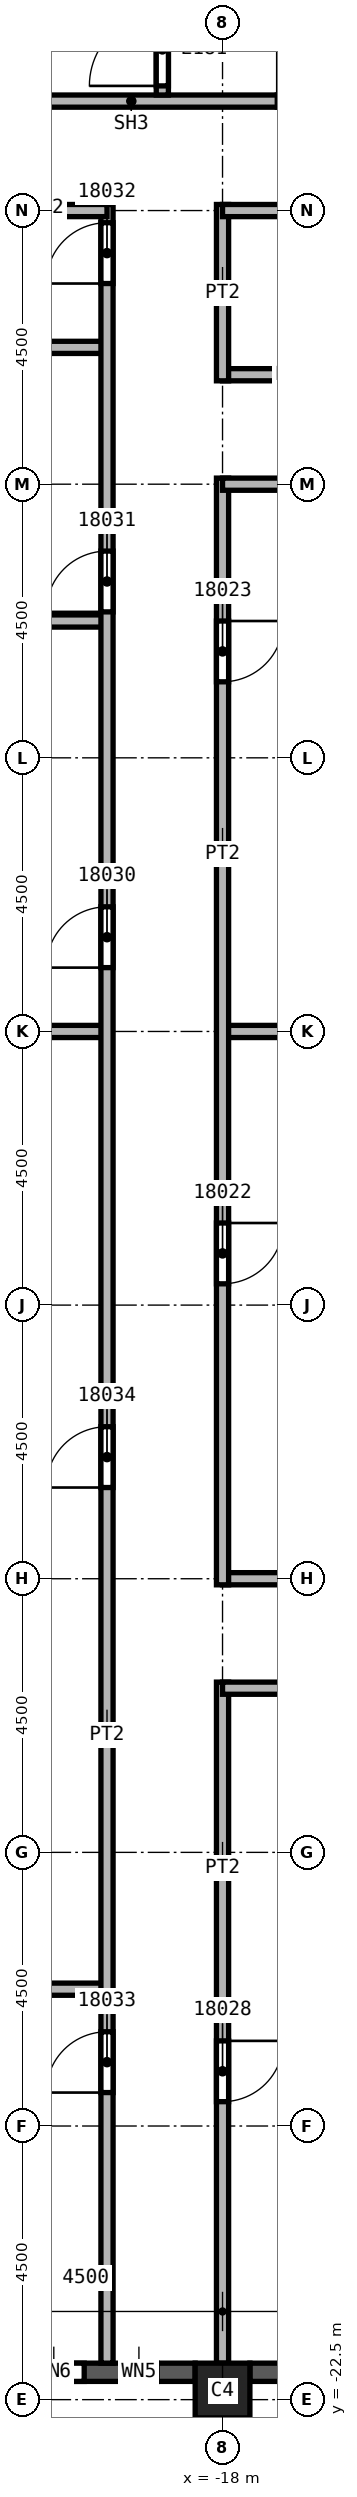
"""IFC4 building model, lengths in metres.
Left out: names, types, materials, properties, quantities, classifications, styles, units other than length and angle.
Written with IfcOpenShell. Run it as: python <this file> out.ifc"""

import sys

from ifc_helpers import new_model, si_unit, direction, frame, frame_2d, origin, origin_2d, place, context, subcontext, project, spatial, rectangle, extrude, element, fill, save


model = new_model("IFC4")
c1 = context("Model", 3, precision=1e-05, world=origin(), true_north=direction((0.0, 1.0)))
c2 = subcontext(c1, "Body", "Model", "MODEL_VIEW")
j1 = project(units=[si_unit("LENGTHUNIT", "METRE"), si_unit("PLANEANGLEUNIT", "RADIAN")], contexts=[c1])
p1 = place(None, origin())
s1 = spatial("IfcSite", under=j1, at=p1, CompositionType="ELEMENT")
p2 = place(p1, origin())
s2 = spatial("IfcBuilding", under=s1, at=p2, CompositionType="ELEMENT")
p3 = place(p2, frame((0.0, 0.0, 266.0)))
s3 = spatial("IfcBuildingStorey", under=s2, at=p3, CompositionType="ELEMENT", Elevation=266.0)
p4 = place(p3, frame((-18.0, -22.35, 0.0), z_axis=(0.0, 0.0, 1.0), x_axis=(1.0, 0.0, 0.0)))
e1 = element("IfcColumn", 1, at=p4, inside=s3, PredefinedType="COLUMN", context=c2, shape_type="SweptSolid", body=[
    extrude(rectangle(XDim=0.9, YDim=0.9, at=origin_2d()), origin(), (0.0, 0.0, 1.0), 3.72),
])
p5 = place(p3, frame((-22.05, -22.05, 0.0), z_axis=(0.0, 0.0, 1.0), x_axis=(1.0, 0.0, 0.0)))
e2 = element("IfcWall", 2, at=p5, inside=s3, PredefinedType="SOLIDWALL", context=c2, shape_type="SweptSolid", body=[
    extrude(rectangle(XDim=3.6, YDim=0.3, at=frame_2d((1.8, 0.0))), origin(), (0.0, 0.0, 1.0), 3.12),
])
p6 = place(p5, frame((0.775, 0.0, 0.8)))
e3 = element("IfcOpeningElement", 3, at=p6, cuts=e2, PredefinedType="OPENING", context=c2, shape_type="SweptSolid", body=[
    extrude(rectangle(XDim=1.0, YDim=1.95, at=frame_2d((0.5, 0.975))), frame((0.0, 0.15, 0.0), z_axis=(0.0, -1.0, 0.0), x_axis=(1.0, 0.0, 0.0)), (0.0, 0.0, 1.0), 0.3),
])
p7 = place(p5, frame((2.375, 0.0, 0.8)))
e4 = element("IfcOpeningElement", 4, at=p7, cuts=e2, PredefinedType="OPENING", context=c2, shape_type="SweptSolid", body=[
    extrude(rectangle(XDim=0.6, YDim=1.95, at=frame_2d((0.3, 0.975))), frame((0.0, 0.15, 0.0), z_axis=(0.0, -1.0, 0.0), x_axis=(1.0, 0.0, 0.0)), (0.0, 0.0, 1.0), 0.3),
])
p8 = place(p3, frame((-17.55, -22.05, 0.0), z_axis=(0.0, 0.0, 1.0), x_axis=(1.0, 0.0, 0.0)))
e5 = element("IfcWall", 5, at=p8, inside=s3, PredefinedType="SOLIDWALL", context=c2, shape_type="SweptSolid", body=[
    extrude(rectangle(XDim=3.6, YDim=0.3, at=frame_2d((1.8, 0.0))), origin(), (0.0, 0.0, 1.0), 3.12),
])
p9 = place(p8, frame((0.6, 0.0, 0.8)))
e6 = element("IfcOpeningElement", 6, at=p9, cuts=e5, PredefinedType="OPENING", context=c2, shape_type="SweptSolid", body=[
    extrude(rectangle(XDim=2.4, YDim=1.95, at=frame_2d((1.2, 0.975))), frame((0.0, 0.15, 0.0), z_axis=(0.0, -1.0, 0.0), x_axis=(1.0, 0.0, 0.0)), (0.0, 0.0, 1.0), 0.3),
])
for number, where, z_axis, x_axis in (
    (7, (-26.55, -15.75, 0.0), (0.0, 0.0, 1.0), (1.0, 0.0, 0.0)),
    (8, (-26.55, 6.75, 0.0), (0.0, 0.0, 1.0), (1.0, 0.0, 0.0)),
    (9, (-26.55, 11.25, 0.0), (0.0, 0.0, 1.0), (1.0, 0.0, 0.0)),
    (10, (-19.9, 0.0, 0.0), (0.0, 0.0, 1.0), (-1.0, 0.0, 0.0)),
):
    element("IfcWall", number, at=place(p3, frame(where, z_axis=z_axis, x_axis=x_axis)), inside=s3, PredefinedType="PARTITIONING", context=c2, shape_type="SweptSolid", body=[
        extrude(rectangle(XDim=6.65, YDim=0.2, at=frame_2d((3.325, 0.0))), origin(), (0.0, 0.0, 1.0), 3.72),
    ])
p10 = place(p3, frame((-19.9, -21.9, 0.0), z_axis=(0.0, 0.0, 1.0), x_axis=(0.0, 1.0, 0.0)))
e11 = element("IfcWall", 11, at=p10, inside=s3, PredefinedType="PARTITIONING", context=c2, shape_type="SweptSolid", body=[
    extrude(rectangle(XDim=35.5, YDim=0.2, at=frame_2d((17.75, 0.0))), origin(), (0.0, 0.0, 1.0), 3.72),
])
p11 = place(p10, frame((22.95, 0.0, 0.0)))
e12 = element("IfcOpeningElement", 12, at=p11, cuts=e11, PredefinedType="OPENING", context=c2, shape_type="SweptSolid", body=[
    extrude(rectangle(XDim=1.0, YDim=2.1, at=frame_2d((0.5, 1.05))), frame((0.0, 0.1, 0.0), z_axis=(0.0, -1.0, 0.0), x_axis=(1.0, 0.0, 0.0)), (0.0, 0.0, 1.0), 0.2),
])
p12 = place(p10, frame((28.8, 0.0, 0.0)))
e13 = element("IfcOpeningElement", 13, at=p12, cuts=e11, PredefinedType="OPENING", context=c2, shape_type="SweptSolid", body=[
    extrude(rectangle(XDim=1.0, YDim=2.1, at=frame_2d((0.5, 1.05))), frame((0.0, 0.1, 0.0), z_axis=(0.0, -1.0, 0.0), x_axis=(1.0, 0.0, 0.0)), (0.0, 0.0, 1.0), 0.2),
])
p13 = place(p10, frame((34.2, 0.0, 0.0)))
e14 = element("IfcOpeningElement", 14, at=p13, cuts=e11, PredefinedType="OPENING", context=c2, shape_type="SweptSolid", body=[
    extrude(rectangle(XDim=1.0, YDim=2.1, at=frame_2d((0.5, 1.05))), frame((0.0, 0.1, 0.0), z_axis=(0.0, -1.0, 0.0), x_axis=(1.0, 0.0, 0.0)), (0.0, 0.0, 1.0), 0.2),
])
p14 = place(p10, frame((4.45, 0.0, 0.0)))
e15 = element("IfcOpeningElement", 15, at=p14, cuts=e11, PredefinedType="OPENING", context=c2, shape_type="SweptSolid", body=[
    extrude(rectangle(XDim=1.0, YDim=2.1, at=frame_2d((0.5, 1.05))), frame((0.0, 0.1, 0.0), z_axis=(0.0, -1.0, 0.0), x_axis=(1.0, 0.0, 0.0)), (0.0, 0.0, 1.0), 0.2),
])
p15 = place(p10, frame((14.4, 0.0, 0.0)))
e16 = element("IfcOpeningElement", 16, at=p15, cuts=e11, PredefinedType="OPENING", context=c2, shape_type="SweptSolid", body=[
    extrude(rectangle(XDim=1.0, YDim=2.1, at=frame_2d((0.5, 1.05))), frame((0.0, 0.1, 0.0), z_axis=(0.0, -1.0, 0.0), x_axis=(1.0, 0.0, 0.0)), (0.0, 0.0, 1.0), 0.2),
])
p16 = place(p3, frame((-19.9, 13.5, 0.0), z_axis=(0.0, 0.0, 1.0), x_axis=(-1.0, 0.0, 0.0)))
e17 = element("IfcWall", 17, at=p16, inside=s3, PredefinedType="PARTITIONING", context=c2, shape_type="SweptSolid", body=[
    extrude(rectangle(XDim=2.1, YDim=0.2, at=frame_2d((1.05, 0.0))), origin(), (0.0, 0.0, 1.0), 3.72),
])
p17 = place(p3, frame((-18.0, -10.7, 0.0), z_axis=(0.0, 0.0, 1.0), x_axis=(0.0, -1.0, 0.0)))
e18 = element("IfcWall", 18, at=p17, inside=s3, PredefinedType="PARTITIONING", context=c2, shape_type="SweptSolid", body=[
    extrude(rectangle(XDim=11.2, YDim=0.2, at=frame_2d((5.6, 0.0))), origin(), (0.0, 0.0, 1.0), 3.72),
])
p18 = place(p17, frame((5.9, 0.0, 0.0)))
e19 = element("IfcOpeningElement", 19, at=p18, cuts=e18, PredefinedType="OPENING", context=c2, shape_type="SweptSolid", body=[
    extrude(rectangle(XDim=1.0, YDim=2.1, at=frame_2d((0.5, 1.05))), frame((0.0, 0.1, 0.0), z_axis=(0.0, -1.0, 0.0), x_axis=(1.0, 0.0, 0.0)), (0.0, 0.0, 1.0), 0.2),
])
for number, where, z_axis, x_axis in (
    (20, (-18.0, -9.0, 0.0), (0.0, 0.0, 1.0), (1.0, 0.0, 0.0)),
    (21, (-18.0, 0.0, 0.0), (0.0, 0.0, 1.0), (1.0, 0.0, 0.0)),
):
    element("IfcWall", number, at=place(p3, frame(where, z_axis=z_axis, x_axis=x_axis)), inside=s3, PredefinedType="PARTITIONING", context=c2, shape_type="SweptSolid", body=[
        extrude(rectangle(XDim=4.5, YDim=0.2, at=frame_2d((2.25, 0.0))), origin(), (0.0, 0.0, 1.0), 3.72),
    ])
p19 = place(p3, frame((-18.0, 9.1, 0.0), z_axis=(0.0, 0.0, 1.0), x_axis=(0.0, -1.0, 0.0)))
e22 = element("IfcWall", 22, at=p19, inside=s3, PredefinedType="PARTITIONING", context=c2, shape_type="SweptSolid", body=[
    extrude(rectangle(XDim=18.2, YDim=0.2, at=frame_2d((9.1, 0.0))), origin(), (0.0, 0.0, 1.0), 3.72),
])
p20 = place(p19, frame((12.25, 0.0, 0.0)))
e23 = element("IfcOpeningElement", 23, at=p20, cuts=e22, PredefinedType="OPENING", context=c2, shape_type="SweptSolid", body=[
    extrude(rectangle(XDim=1.0, YDim=2.1, at=frame_2d((0.5, 1.05))), frame((0.0, 0.1, 0.0), z_axis=(0.0, -1.0, 0.0), x_axis=(1.0, 0.0, 0.0)), (0.0, 0.0, 1.0), 0.2),
])
p21 = place(p19, frame((2.35, 0.0, 0.0)))
e24 = element("IfcOpeningElement", 24, at=p21, cuts=e22, PredefinedType="OPENING", context=c2, shape_type="SweptSolid", body=[
    extrude(rectangle(XDim=1.0, YDim=2.1, at=frame_2d((0.5, 1.05))), frame((0.0, 0.1, 0.0), z_axis=(0.0, -1.0, 0.0), x_axis=(1.0, 0.0, 0.0)), (0.0, 0.0, 1.0), 0.2),
])
p22 = place(p3, frame((-18.0, 10.8, 0.0), z_axis=(0.0, 0.0, 1.0), x_axis=(1.0, 0.0, 0.0)))
e25 = element("IfcWall", 25, at=p22, inside=s3, PredefinedType="PARTITIONING", context=c2, shape_type="SweptSolid", body=[
    extrude(rectangle(XDim=3.6, YDim=0.2, at=frame_2d((1.8, 0.0))), origin(), (0.0, 0.0, 1.0), 3.72),
])
p23 = place(p22, frame((2.2, 0.0, 0.0)))
e26 = element("IfcOpeningElement", 26, at=p23, cuts=e25, PredefinedType="OPENING", context=c2, shape_type="SweptSolid", body=[
    extrude(rectangle(XDim=1.0, YDim=2.1, at=frame_2d((0.5, 1.05))), frame((0.0, 0.1, 0.0), z_axis=(0.0, -1.0, 0.0), x_axis=(1.0, 0.0, 0.0)), (0.0, 0.0, 1.0), 0.2),
])
p24 = place(p3, frame((-18.0, 13.6, 0.0), z_axis=(0.0, 0.0, 1.0), x_axis=(0.0, -1.0, 0.0)))
e27 = element("IfcWall", 27, at=p24, inside=s3, PredefinedType="PARTITIONING", context=c2, shape_type="SweptSolid", body=[
    extrude(rectangle(XDim=2.9, YDim=0.2, at=frame_2d((1.45, 0.0))), origin(), (0.0, 0.0, 1.0), 3.72),
])
p25 = place(p3, frame((-15.3, 13.5, 0.0), z_axis=(0.0, 0.0, 1.0), x_axis=(-1.0, 0.0, 0.0)))
e28 = element("IfcWall", 28, at=p25, inside=s3, PredefinedType="PARTITIONING", context=c2, shape_type="SweptSolid", body=[
    extrude(rectangle(XDim=2.7, YDim=0.2, at=frame_2d((1.35, 0.0))), origin(), (0.0, 0.0, 1.0), 3.72),
])
p26 = place(p3, frame((-14.4, -10.8, 0.0), z_axis=(0.0, 0.0, 1.0), x_axis=(-1.0, 0.0, 0.0)))
e29 = element("IfcWall", 29, at=p26, inside=s3, PredefinedType="PARTITIONING", context=c2, shape_type="SweptSolid", body=[
    extrude(rectangle(XDim=3.6, YDim=0.2, at=frame_2d((1.8, 0.0))), origin(), (0.0, 0.0, 1.0), 3.72),
])
p27 = place(p3, frame((-13.5, 9.0, 0.0), z_axis=(0.0, 0.0, 1.0), x_axis=(-1.0, 0.0, 0.0)))
e30 = element("IfcWall", 30, at=p27, inside=s3, PredefinedType="PARTITIONING", context=c2, shape_type="SweptSolid", body=[
    extrude(rectangle(XDim=4.5, YDim=0.2, at=frame_2d((2.25, 0.0))), origin(), (0.0, 0.0, 1.0), 3.72),
])
p28 = place(p3, frame((-21.9, 15.3, 0.0), z_axis=(0.0, 0.0, 1.0), x_axis=(1.0, 0.0, 0.0)))
e31 = element("IfcWall", 31, at=p28, inside=s3, PredefinedType="SOLIDWALL", context=c2, shape_type="SweptSolid", body=[
    extrude(rectangle(XDim=8.275, YDim=0.2, at=frame_2d((4.137, 0.0))), origin(), (0.0, 0.0, 1.0), 3.72),
])
p29 = place(p28, frame((4.8, 0.0, 0.0)))
e32 = element("IfcOpeningElement", 32, at=p29, cuts=e31, PredefinedType="OPENING", context=c2, shape_type="SweptSolid", body=[
    extrude(rectangle(XDim=1.2, YDim=2.1, at=frame_2d((0.6, 1.05))), frame((0.0, 0.1, 0.0), z_axis=(0.0, -1.0, 0.0), x_axis=(1.0, 0.0, 0.0)), (0.0, 0.0, 1.0), 0.2),
])
p30 = place(p3, frame((-18.99, 15.4, 0.0), z_axis=(0.0, 0.0, 1.0), x_axis=(0.0, 1.0, 0.0)))
e33 = element("IfcWall", 33, at=p30, inside=s3, PredefinedType="SOLIDWALL", context=c2, shape_type="SweptSolid", body=[
    extrude(rectangle(XDim=5.9, YDim=0.2, at=frame_2d((2.95, 0.0))), origin(), (0.0, 0.0, 1.0), 3.72),
])
p31 = place(p30, frame((0.15, 0.0, 0.0)))
e34 = element("IfcOpeningElement", 34, at=p31, cuts=e33, PredefinedType="OPENING", context=c2, shape_type="SweptSolid", body=[
    extrude(rectangle(XDim=1.2, YDim=2.1, at=frame_2d((0.6, 1.05))), frame((0.0, 0.1, 0.0), z_axis=(0.0, -1.0, 0.0), x_axis=(1.0, 0.0, 0.0)), (0.0, 0.0, 1.0), 0.2),
])
p32 = place(p20, origin())
e35 = element("IfcDoor", 35, at=p32, inside=s3, OperationType="SINGLE_SWING_LEFT", PredefinedType="DOOR", context=c2, shape_type="SweptSolid", body=[
    extrude(rectangle(XDim=1.0, YDim=2.1, at=frame_2d((0.5, 1.05))), frame((0.0, 0.025, 0.0), z_axis=(0.0, -1.0, 0.0), x_axis=(1.0, 0.0, 0.0)), (0.0, 0.0, 1.0), 0.05),
])
fill(e23, e35)
p33 = place(p21, origin())
e36 = element("IfcDoor", 36, at=p33, inside=s3, OperationType="SINGLE_SWING_RIGHT", PredefinedType="DOOR", context=c2, shape_type="SweptSolid", body=[
    extrude(rectangle(XDim=1.0, YDim=2.1, at=frame_2d((0.5, 1.05))), frame((0.0, 0.025, 0.0), z_axis=(0.0, -1.0, 0.0), x_axis=(1.0, 0.0, 0.0)), (0.0, 0.0, 1.0), 0.05),
])
fill(e24, e36)
p34 = place(p18, origin())
e37 = element("IfcDoor", 37, at=p34, inside=s3, OperationType="SINGLE_SWING_LEFT", PredefinedType="DOOR", context=c2, shape_type="SweptSolid", body=[
    extrude(rectangle(XDim=1.0, YDim=2.1, at=frame_2d((0.5, 1.05))), frame((0.0, 0.025, 0.0), z_axis=(0.0, -1.0, 0.0), x_axis=(1.0, 0.0, 0.0)), (0.0, 0.0, 1.0), 0.05),
])
fill(e19, e37)
p35 = place(p11, origin())
e38 = element("IfcDoor", 38, at=p35, inside=s3, OperationType="SINGLE_SWING_LEFT", PredefinedType="DOOR", context=c2, shape_type="SweptSolid", body=[
    extrude(rectangle(XDim=1.0, YDim=2.1, at=frame_2d((0.5, 1.05))), frame((0.0, 0.025, 0.0), z_axis=(0.0, -1.0, 0.0), x_axis=(1.0, 0.0, 0.0)), (0.0, 0.0, 1.0), 0.05),
])
fill(e12, e38)
p36 = place(p12, origin())
e39 = element("IfcDoor", 39, at=p36, inside=s3, OperationType="SINGLE_SWING_RIGHT", PredefinedType="DOOR", context=c2, shape_type="SweptSolid", body=[
    extrude(rectangle(XDim=1.0, YDim=2.1, at=frame_2d((0.5, 1.05))), frame((0.0, 0.025, 0.0), z_axis=(0.0, -1.0, 0.0), x_axis=(1.0, 0.0, 0.0)), (0.0, 0.0, 1.0), 0.05),
])
fill(e13, e39)
p37 = place(p13, origin())
e40 = element("IfcDoor", 40, at=p37, inside=s3, OperationType="SINGLE_SWING_LEFT", PredefinedType="DOOR", context=c2, shape_type="SweptSolid", body=[
    extrude(rectangle(XDim=1.0, YDim=2.1, at=frame_2d((0.5, 1.05))), frame((0.0, 0.025, 0.0), z_axis=(0.0, -1.0, 0.0), x_axis=(1.0, 0.0, 0.0)), (0.0, 0.0, 1.0), 0.05),
])
fill(e14, e40)
p38 = place(p14, origin())
e41 = element("IfcDoor", 41, at=p38, inside=s3, OperationType="SINGLE_SWING_RIGHT", PredefinedType="DOOR", context=c2, shape_type="SweptSolid", body=[
    extrude(rectangle(XDim=1.0, YDim=2.1, at=frame_2d((0.5, 1.05))), frame((0.0, 0.025, 0.0), z_axis=(0.0, -1.0, 0.0), x_axis=(1.0, 0.0, 0.0)), (0.0, 0.0, 1.0), 0.05),
])
fill(e15, e41)
p39 = place(p15, origin())
e42 = element("IfcDoor", 42, at=p39, inside=s3, OperationType="SINGLE_SWING_LEFT", PredefinedType="DOOR", context=c2, shape_type="SweptSolid", body=[
    extrude(rectangle(XDim=1.0, YDim=2.1, at=frame_2d((0.5, 1.05))), frame((0.0, 0.025, 0.0), z_axis=(0.0, -1.0, 0.0), x_axis=(1.0, 0.0, 0.0)), (0.0, 0.0, 1.0), 0.05),
])
fill(e16, e42)
p40 = place(p31, origin())
e43 = element("IfcDoor", 43, at=p40, inside=s3, OperationType="SINGLE_SWING_LEFT", PredefinedType="DOOR", context=c2, shape_type="SweptSolid", body=[
    extrude(rectangle(XDim=1.2, YDim=2.1, at=frame_2d((0.6, 1.05))), frame((0.0, 0.025, 0.0), z_axis=(0.0, -1.0, 0.0), x_axis=(1.0, 0.0, 0.0)), (0.0, 0.0, 1.0), 0.05),
])
fill(e34, e43)
p41 = place(p6, origin())
e44 = element("IfcWindow", 44, at=p41, inside=s3, PartitioningType="SINGLE_PANEL", PredefinedType="WINDOW", context=c2, shape_type="SweptSolid", body=[
    extrude(rectangle(XDim=1.0, YDim=1.95, at=frame_2d((0.5, 0.975))), frame((0.0, 0.03, 0.0), z_axis=(0.0, -1.0, 0.0), x_axis=(1.0, 0.0, 0.0)), (0.0, 0.0, 1.0), 0.06),
])
fill(e3, e44)
p42 = place(p7, origin())
e45 = element("IfcWindow", 45, at=p42, inside=s3, PartitioningType="SINGLE_PANEL", PredefinedType="WINDOW", context=c2, shape_type="SweptSolid", body=[
    extrude(rectangle(XDim=0.6, YDim=1.95, at=frame_2d((0.3, 0.975))), frame((0.0, 0.03, 0.0), z_axis=(0.0, -1.0, 0.0), x_axis=(1.0, 0.0, 0.0)), (0.0, 0.0, 1.0), 0.06),
])
fill(e4, e45)
save(model, sys.argv[1])
